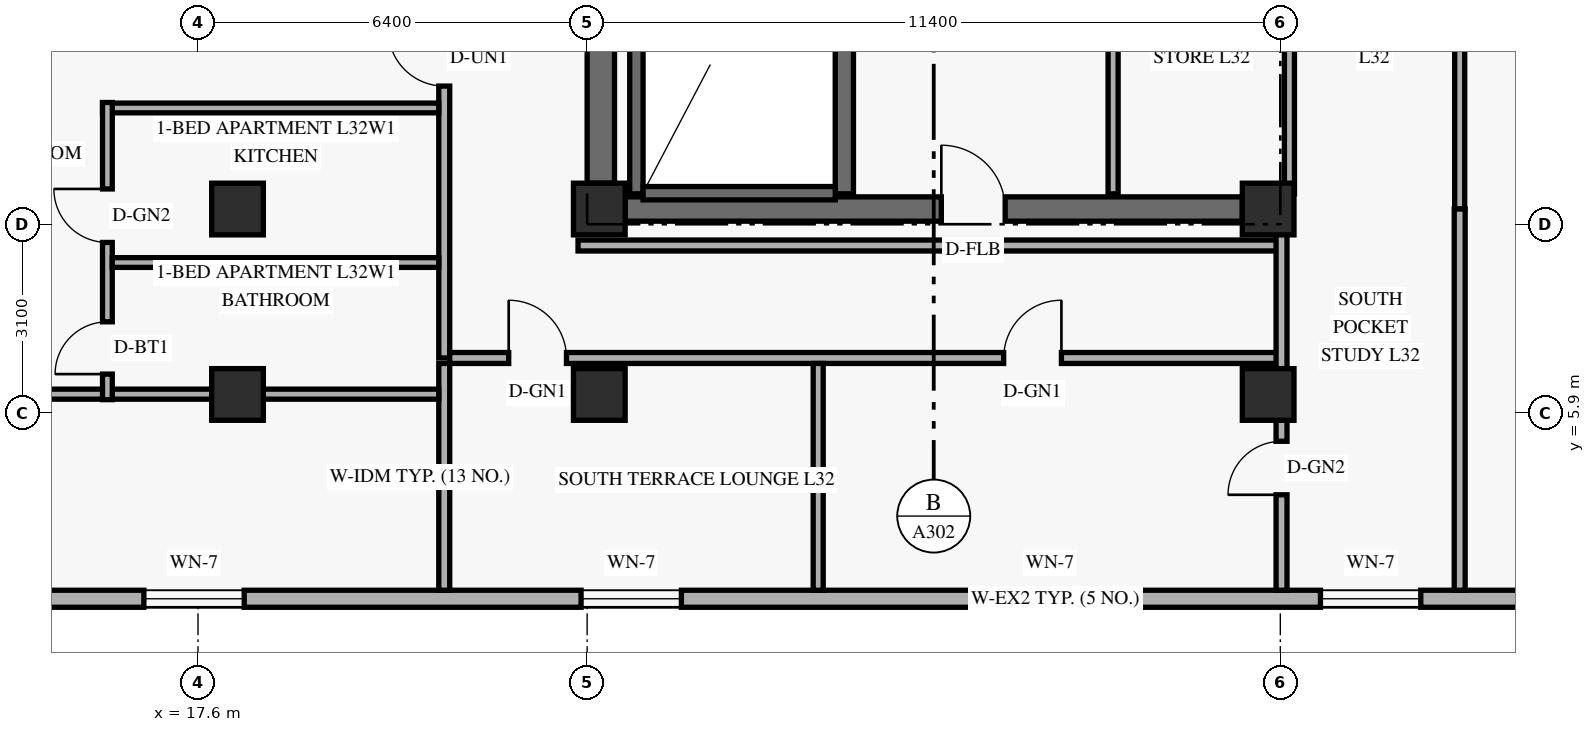
"""IFC4 building model, lengths in metres.
Left out: names, types, materials, properties, quantities, classifications, styles, units other than length and angle.
Written with IfcOpenShell. Run it as: python <this file> out.ifc"""

import sys

from ifc_helpers import new_model, si_unit, direction, frame, frame_2d, origin, origin_2d, place, context, subcontext, project, spatial, rectangle, extrude, element, fill, save


model = new_model("IFC4")
c1 = context("Model", 3, precision=1e-05, world=origin(), true_north=direction((0.0, 1.0)))
c2 = subcontext(c1, "Body", "Model", "MODEL_VIEW")
j1 = project(units=[si_unit("LENGTHUNIT", "METRE"), si_unit("PLANEANGLEUNIT", "RADIAN")], contexts=[c1])
p1 = place(None, origin())
s1 = spatial("IfcSite", under=j1, at=p1, CompositionType="ELEMENT")
p2 = place(p1, origin())
s2 = spatial("IfcBuilding", under=s1, at=p2, CompositionType="ELEMENT")
p3 = place(p2, frame((0.0, 0.0, 124.8)))
s3 = spatial("IfcBuildingStorey", under=s2, at=p3, CompositionType="ELEMENT", Elevation=124.8)
p4 = place(p3, frame((24.225, 9.675, 0.0), z_axis=(0.0, 0.0, 1.0), x_axis=(0.0, 1.0, 0.0)))
e1 = element("IfcWall", 1, at=p4, inside=s3, PredefinedType="SHEAR", context=c2, shape_type="SweptSolid", body=[
    extrude(rectangle(XDim=7.45, YDim=0.45, at=frame_2d((3.725, 0.0))), origin(), (0.0, 0.0, 1.0), 2.749),
])
p5 = place(p3, frame((24.625, 9.25, 0.0), z_axis=(0.0, 0.0, 1.0), x_axis=(1.0, 0.0, 0.0)))
e2 = element("IfcWall", 2, at=p5, inside=s3, PredefinedType="SHEAR", context=c2, shape_type="SweptSolid", body=[
    extrude(rectangle(XDim=10.15, YDim=0.4, at=frame_2d((5.075, 0.0))), origin(), (0.0, 0.0, 1.0), 3.36),
])
p6 = place(p5, frame((5.2, 0.0, 0.0)))
e3 = element("IfcOpeningElement", 3, at=p6, cuts=e2, PredefinedType="OPENING", context=c2, shape_type="SweptSolid", body=[
    extrude(rectangle(XDim=1.05, YDim=2.15, at=frame_2d((0.525, 1.075))), frame((0.0, 0.21, 0.0), z_axis=(0.0, -1.0, 0.0), x_axis=(1.0, 0.0, 0.0)), (0.0, 0.0, 1.0), 0.42),
])
p7 = place(p3, frame((24.81, 9.5, 0.0), z_axis=(0.0, 0.0, 1.0), x_axis=(0.0, 1.0, 0.0)))
e4 = element("IfcWall", 4, at=p7, inside=s3, PredefinedType="SHEAR", context=c2, shape_type="SweptSolid", body=[
    extrude(rectangle(XDim=7.76, YDim=0.22, at=frame_2d((3.88, 0.0))), origin(), (0.0, 0.0, 1.0), 3.36),
])
p8 = place(p3, frame((28.23, 9.5, 0.0), z_axis=(0.0, 0.0, 1.0), x_axis=(0.0, 1.0, 0.0)))
e5 = element("IfcWall", 5, at=p8, inside=s3, PredefinedType="SHEAR", context=c2, shape_type="SweptSolid", body=[
    extrude(rectangle(XDim=7.76, YDim=0.3, at=frame_2d((3.88, 0.0))), origin(), (0.0, 0.0, 1.0), 3.36),
])
p9 = place(p3, frame((24.92, 9.51, 0.0), z_axis=(0.0, 0.0, 1.0), x_axis=(1.0, 0.0, 0.0)))
e6 = element("IfcWall", 6, at=p9, inside=s3, PredefinedType="SHEAR", context=c2, shape_type="SweptSolid", body=[
    extrude(rectangle(XDim=3.16, YDim=0.22, at=frame_2d((1.58, 0.0))), origin(), (0.0, 0.0, 1.0), 3.36),
])
for number, where, z_axis, x_axis in (
    (7, (18.25, 6.2, 0.0), (0.0, 0.0, 1.0), (1.0, 0.0, 0.0)),
    (8, (18.25, 9.25, 0.0), (0.0, 0.0, 1.0), (1.0, 0.0, 0.0)),
    (9, (24.2, 6.2, 0.0), (0.0, 0.0, 1.0), (1.0, 0.0, 0.0)),
    (10, (24.2, 9.25, 0.0), (0.0, 0.0, 1.0), (1.0, 0.0, 0.0)),
    (11, (35.2, 6.2, 0.0), (0.0, 0.0, 1.0), (1.0, 0.0, 0.0)),
    (12, (35.2, 9.25, 0.0), (0.0, 0.0, 1.0), (1.0, 0.0, 0.0)),
):
    element("IfcColumn", number, at=place(p3, frame(where, z_axis=z_axis, x_axis=x_axis)), inside=s3, PredefinedType="COLUMN", context=c2, shape_type="SweptSolid", body=[
        extrude(rectangle(XDim=0.85, YDim=0.85, at=origin_2d()), origin(), (0.0, 0.0, 1.0), 3.6),
    ])
p10 = place(p3, frame((13.42, 2.84, 0.0), z_axis=(0.0, 0.0, 1.0), x_axis=(1.0, 0.0, 0.0)))
e13 = element("IfcWall", 13, at=p10, inside=s3, PredefinedType="SOLIDWALL", context=c2, shape_type="SweptSolid", body=[
    extrude(rectangle(XDim=36.56, YDim=0.28, at=frame_2d((18.28, 0.0))), origin(), (0.0, 0.0, 1.0), 3.36),
])
p11 = place(p10, frame((3.29, 0.0, 0.85)))
e14 = element("IfcOpeningElement", 14, at=p11, cuts=e13, PredefinedType="OPENING", context=c2, shape_type="SweptSolid", body=[
    extrude(rectangle(XDim=1.65, YDim=1.6, at=frame_2d((0.825, 0.8))), frame((0.0, 0.15, 0.0), z_axis=(0.0, -1.0, 0.0), x_axis=(1.0, 0.0, 0.0)), (0.0, 0.0, 1.0), 0.3),
])
p12 = place(p10, frame((10.48, 0.0, 0.85)))
e15 = element("IfcOpeningElement", 15, at=p12, cuts=e13, PredefinedType="OPENING", context=c2, shape_type="SweptSolid", body=[
    extrude(rectangle(XDim=1.65, YDim=1.6, at=frame_2d((0.825, 0.8))), frame((0.0, 0.15, 0.0), z_axis=(0.0, -1.0, 0.0), x_axis=(1.0, 0.0, 0.0)), (0.0, 0.0, 1.0), 0.3),
])
p13 = place(p10, frame((17.365, 0.0, 0.85)))
e16 = element("IfcOpeningElement", 16, at=p13, cuts=e13, PredefinedType="OPENING", context=c2, shape_type="SweptSolid", body=[
    extrude(rectangle(XDim=1.65, YDim=1.6, at=frame_2d((0.825, 0.8))), frame((0.0, 0.15, 0.0), z_axis=(0.0, -1.0, 0.0), x_axis=(1.0, 0.0, 0.0)), (0.0, 0.0, 1.0), 0.3),
])
p14 = place(p10, frame((22.64, 0.0, 0.85)))
e17 = element("IfcOpeningElement", 17, at=p14, cuts=e13, PredefinedType="OPENING", context=c2, shape_type="SweptSolid", body=[
    extrude(rectangle(XDim=1.65, YDim=1.6, at=frame_2d((0.825, 0.8))), frame((0.0, 0.15, 0.0), z_axis=(0.0, -1.0, 0.0), x_axis=(1.0, 0.0, 0.0)), (0.0, 0.0, 1.0), 0.3),
])
p15 = place(p10, frame((28.43, 0.0, 0.85)))
e18 = element("IfcOpeningElement", 18, at=p15, cuts=e13, PredefinedType="OPENING", context=c2, shape_type="SweptSolid", body=[
    extrude(rectangle(XDim=1.65, YDim=1.6, at=frame_2d((0.825, 0.8))), frame((0.0, 0.15, 0.0), z_axis=(0.0, -1.0, 0.0), x_axis=(1.0, 0.0, 0.0)), (0.0, 0.0, 1.0), 0.3),
])
p16 = place(p10, frame((34.245, 0.0, 0.85)))
e19 = element("IfcOpeningElement", 19, at=p16, cuts=e13, PredefinedType="OPENING", context=c2, shape_type="SweptSolid", body=[
    extrude(rectangle(XDim=1.65, YDim=1.6, at=frame_2d((0.825, 0.8))), frame((0.0, 0.15, 0.0), z_axis=(0.0, -1.0, 0.0), x_axis=(1.0, 0.0, 0.0)), (0.0, 0.0, 1.0), 0.3),
])
p17 = place(p3, frame((32.65, 9.5, 0.0), z_axis=(0.0, 0.0, 1.0), x_axis=(0.0, 1.0, 0.0)))
e20 = element("IfcWall", 20, at=p17, inside=s3, PredefinedType="PARTITIONING", context=c2, shape_type="SweptSolid", body=[
    extrude(rectangle(XDim=6.08, YDim=0.165, at=frame_2d((3.04, 0.0))), origin(), (0.0, 0.0, 1.0), 3.36),
])
p18 = place(p3, frame((38.35, 9.25, 0.0), z_axis=(0.0, 0.0, 1.0), x_axis=(0.0, 1.0, 0.0)))
e21 = element("IfcWall", 21, at=p18, inside=s3, PredefinedType="PARTITIONING", context=c2, shape_type="SweptSolid", body=[
    extrude(rectangle(XDim=6.248, YDim=0.165, at=frame_2d((3.124, 0.0))), origin(), (0.0, 0.0, 1.0), 2.731),
])
p19 = place(p3, frame((35.55, 9.5, 0.0), z_axis=(0.0, 0.0, 1.0), x_axis=(0.0, 1.0, 0.0)))
e22 = element("IfcWall", 22, at=p19, inside=s3, PredefinedType="PARTITIONING", context=c2, shape_type="SweptSolid", body=[
    extrude(rectangle(XDim=5.998, YDim=0.165, at=frame_2d((2.999, 0.0))), origin(), (0.0, 0.0, 1.0), 2.988),
])
p20 = place(p3, frame((21.65, 6.8, 0.0), z_axis=(0.0, 0.0, 1.0), x_axis=(0.0, 1.0, 0.0)))
e23 = element("IfcWall", 23, at=p20, inside=s3, PredefinedType="STANDARD", context=c2, shape_type="SweptSolid", body=[
    extrude(rectangle(XDim=34.4, YDim=0.18, at=frame_2d((17.2, 0.0))), origin(), (0.0, 0.0, 1.0), 2.731),
])
p21 = place(p20, frame((4.472, 0.0, 0.0)))
e24 = element("IfcOpeningElement", 24, at=p21, cuts=e23, PredefinedType="OPENING", context=c2, shape_type="SweptSolid", body=[
    extrude(rectangle(XDim=0.92, YDim=2.15, at=frame_2d((0.46, 1.075))), frame((0.0, 0.1, 0.0), z_axis=(0.0, -1.0, 0.0), x_axis=(1.0, 0.0, 0.0)), (0.0, 0.0, 1.0), 0.2),
])
p22 = place(p20, frame((7.261, 0.0, 0.0)))
e25 = element("IfcOpeningElement", 25, at=p22, cuts=e23, PredefinedType="OPENING", context=c2, shape_type="SweptSolid", body=[
    extrude(rectangle(XDim=0.92, YDim=2.15, at=frame_2d((0.46, 1.075))), frame((0.0, 0.1, 0.0), z_axis=(0.0, -1.0, 0.0), x_axis=(1.0, 0.0, 0.0)), (0.0, 0.0, 1.0), 0.2),
])
p23 = place(p20, frame((18.308, 0.0, 0.0)))
e26 = element("IfcOpeningElement", 26, at=p23, cuts=e23, PredefinedType="OPENING", context=c2, shape_type="SweptSolid", body=[
    extrude(rectangle(XDim=0.92, YDim=2.15, at=frame_2d((0.46, 1.075))), frame((0.0, 0.1, 0.0), z_axis=(0.0, -1.0, 0.0), x_axis=(1.0, 0.0, 0.0)), (0.0, 0.0, 1.0), 0.2),
])
p24 = place(p20, frame((29.045, 0.0, 0.0)))
e27 = element("IfcOpeningElement", 27, at=p24, cuts=e23, PredefinedType="OPENING", context=c2, shape_type="SweptSolid", body=[
    extrude(rectangle(XDim=0.92, YDim=2.15, at=frame_2d((0.46, 1.075))), frame((0.0, 0.1, 0.0), z_axis=(0.0, -1.0, 0.0), x_axis=(1.0, 0.0, 0.0)), (0.0, 0.0, 1.0), 0.2),
])
p25 = place(p3, frame((21.74, 6.8, 0.0), z_axis=(0.0, 0.0, 1.0), x_axis=(1.0, 0.0, 0.0)))
e28 = element("IfcWall", 28, at=p25, inside=s3, PredefinedType="STANDARD", context=c2, shape_type="SweptSolid", body=[
    extrude(rectangle(XDim=13.68, YDim=0.18, at=frame_2d((6.84, 0.0))), origin(), (0.0, 0.0, 1.0), 2.731),
])
p26 = place(p25, frame((0.97, 0.0, 0.0)))
e29 = element("IfcOpeningElement", 29, at=p26, cuts=e28, PredefinedType="OPENING", context=c2, shape_type="SweptSolid", body=[
    extrude(rectangle(XDim=0.95, YDim=2.15, at=frame_2d((0.475, 1.075))), frame((0.0, 0.1, 0.0), z_axis=(0.0, -1.0, 0.0), x_axis=(1.0, 0.0, 0.0)), (0.0, 0.0, 1.0), 0.2),
])
p27 = place(p25, frame((9.11, 0.0, 0.0)))
e30 = element("IfcOpeningElement", 30, at=p27, cuts=e28, PredefinedType="OPENING", context=c2, shape_type="SweptSolid", body=[
    extrude(rectangle(XDim=0.95, YDim=2.15, at=frame_2d((0.475, 1.075))), frame((0.0, 0.1, 0.0), z_axis=(0.0, -1.0, 0.0), x_axis=(1.0, 0.0, 0.0)), (0.0, 0.0, 1.0), 0.2),
])
p28 = place(p3, frame((23.85, 8.65, 0.0), z_axis=(0.0, 0.0, 1.0), x_axis=(1.0, 0.0, 0.0)))
e31 = element("IfcWall", 31, at=p28, inside=s3, PredefinedType="STANDARD", context=c2, shape_type="SweptSolid", body=[
    extrude(rectangle(XDim=11.57, YDim=0.18, at=frame_2d((5.785, 0.0))), origin(), (0.0, 0.0, 1.0), 2.731),
])
p29 = place(p3, frame((21.65, 2.98, 0.0), z_axis=(0.0, 0.0, 1.0), x_axis=(0.0, 1.0, 0.0)))
e32 = element("IfcWall", 32, at=p29, inside=s3, PredefinedType="PARTITIONING", context=c2, shape_type="SweptSolid", body=[
    extrude(rectangle(XDim=3.73, YDim=0.18, at=frame_2d((1.865, 0.0))), origin(), (0.0, 0.0, 1.0), 2.809),
])
p30 = place(p3, frame((35.42, 2.98, 0.0), z_axis=(0.0, 0.0, 1.0), x_axis=(0.0, 1.0, 0.0)))
e33 = element("IfcWall", 33, at=p30, inside=s3, PredefinedType="PARTITIONING", context=c2, shape_type="SweptSolid", body=[
    extrude(rectangle(XDim=6.27, YDim=0.18, at=frame_2d((3.135, 0.0))), origin(), (0.0, 0.0, 1.0), 2.731),
])
p31 = place(p30, frame((1.57, 0.0, 0.0)))
e34 = element("IfcOpeningElement", 34, at=p31, cuts=e33, PredefinedType="OPENING", context=c2, shape_type="SweptSolid", body=[
    extrude(rectangle(XDim=0.88, YDim=2.12, at=frame_2d((0.44, 1.06))), frame((0.0, 0.1, 0.0), z_axis=(0.0, -1.0, 0.0), x_axis=(1.0, 0.0, 0.0)), (0.0, 0.0, 1.0), 0.2),
])
p32 = place(p3, frame((38.35, 2.98, 0.0), z_axis=(0.0, 0.0, 1.0), x_axis=(0.0, 1.0, 0.0)))
e35 = element("IfcWall", 35, at=p32, inside=s3, PredefinedType="PARTITIONING", context=c2, shape_type="SweptSolid", body=[
    extrude(rectangle(XDim=6.27, YDim=0.18, at=frame_2d((3.135, 0.0))), origin(), (0.0, 0.0, 1.0), 2.731),
])
p33 = place(p3, frame((10.099, 6.205, 0.0), z_axis=(0.0, 0.0, 1.0), x_axis=(1.0, 0.0, 0.0)))
e36 = element("IfcWall", 36, at=p33, inside=s3, PredefinedType="PARTITIONING", context=c2, shape_type="SweptSolid", body=[
    extrude(rectangle(XDim=11.461, YDim=0.165, at=frame_2d((5.73, 0.0))), origin(), (0.0, 0.0, 1.0), 2.809),
])
p34 = place(p33, frame((2.391, 0.0, 0.0)))
e37 = element("IfcOpeningElement", 37, at=p34, cuts=e36, PredefinedType="OPENING", context=c2, shape_type="SweptSolid", body=[
    extrude(rectangle(XDim=0.9, YDim=2.14, at=frame_2d((0.45, 1.07))), frame((0.0, 0.093, 0.0), z_axis=(0.0, -1.0, 0.0), x_axis=(1.0, 0.0, 0.0)), (0.0, 0.0, 1.0), 0.185),
])
p35 = place(p3, frame((16.03, 10.912, 0.0), z_axis=(0.0, 0.0, 1.0), x_axis=(1.0, 0.0, 0.0)))
e38 = element("IfcWall", 38, at=p35, inside=s3, PredefinedType="PLUMBINGWALL", context=c2, shape_type="SweptSolid", body=[
    extrude(rectangle(XDim=5.53, YDim=0.16, at=frame_2d((2.765, 0.0))), origin(), (0.0, 0.0, 1.0), 2.731),
])
p36 = place(p3, frame((16.11, 6.115, 0.0), z_axis=(0.0, 0.0, 1.0), x_axis=(0.0, 1.0, 0.0)))
e39 = element("IfcWall", 39, at=p36, inside=s3, PredefinedType="PLUMBINGWALL", context=c2, shape_type="SweptSolid", body=[
    extrude(rectangle(XDim=4.887, YDim=0.16, at=frame_2d((2.443, 0.0))), origin(), (0.0, 0.0, 1.0), 2.731),
])
p37 = place(p36, frame((0.42, 0.0, 0.0)))
e40 = element("IfcOpeningElement", 40, at=p37, cuts=e39, PredefinedType="OPENING", context=c2, shape_type="SweptSolid", body=[
    extrude(rectangle(XDim=0.86, YDim=2.12, at=frame_2d((0.43, 1.06))), frame((0.0, 0.09, 0.0), z_axis=(0.0, -1.0, 0.0), x_axis=(1.0, 0.0, 0.0)), (0.0, 0.0, 1.0), 0.18),
])
p38 = place(p36, frame((2.585, 0.0, 0.0)))
e41 = element("IfcOpeningElement", 41, at=p38, cuts=e39, PredefinedType="OPENING", context=c2, shape_type="SweptSolid", body=[
    extrude(rectangle(XDim=0.88, YDim=2.12, at=frame_2d((0.44, 1.06))), frame((0.0, 0.09, 0.0), z_axis=(0.0, -1.0, 0.0), x_axis=(1.0, 0.0, 0.0)), (0.0, 0.0, 1.0), 0.18),
])
p39 = place(p3, frame((16.19, 8.37, 0.0), z_axis=(0.0, 0.0, 1.0), x_axis=(1.0, 0.0, 0.0)))
e42 = element("IfcWall", 42, at=p39, inside=s3, PredefinedType="PLUMBINGWALL", context=c2, shape_type="SweptSolid", body=[
    extrude(rectangle(XDim=5.37, YDim=0.16, at=frame_2d((2.685, 0.0))), origin(), (0.0, 0.0, 1.0), 2.731),
])
p40 = place(p3, frame((27.8, 2.98, 0.0), z_axis=(0.0, 0.0, 1.0), x_axis=(0.0, 1.0, 0.0)))
e43 = element("IfcWall", 43, at=p40, inside=s3, PredefinedType="PARTITIONING", context=c2, shape_type="SweptSolid", body=[
    extrude(rectangle(XDim=3.73, YDim=0.165, at=frame_2d((1.865, 0.0))), origin(), (0.0, 0.0, 1.0), 2.809),
])
p41 = place(p11, origin())
e44 = element("IfcWindow", 44, at=p41, inside=s3, PartitioningType="SINGLE_PANEL", PredefinedType="WINDOW", context=c2, shape_type="SweptSolid", body=[
    extrude(rectangle(XDim=1.65, YDim=1.6, at=frame_2d((0.825, 0.8))), frame((0.0, 0.03, 0.0), z_axis=(0.0, -1.0, 0.0), x_axis=(1.0, 0.0, 0.0)), (0.0, 0.0, 1.0), 0.06),
])
fill(e14, e44)
p42 = place(p12, origin())
e45 = element("IfcWindow", 45, at=p42, inside=s3, PartitioningType="SINGLE_PANEL", PredefinedType="WINDOW", context=c2, shape_type="SweptSolid", body=[
    extrude(rectangle(XDim=1.65, YDim=1.6, at=frame_2d((0.825, 0.8))), frame((0.0, 0.03, 0.0), z_axis=(0.0, -1.0, 0.0), x_axis=(1.0, 0.0, 0.0)), (0.0, 0.0, 1.0), 0.06),
])
fill(e15, e45)
p43 = place(p13, origin())
e46 = element("IfcWindow", 46, at=p43, inside=s3, PartitioningType="SINGLE_PANEL", PredefinedType="WINDOW", context=c2, shape_type="SweptSolid", body=[
    extrude(rectangle(XDim=1.65, YDim=1.6, at=frame_2d((0.825, 0.8))), frame((0.0, 0.03, 0.0), z_axis=(0.0, -1.0, 0.0), x_axis=(1.0, 0.0, 0.0)), (0.0, 0.0, 1.0), 0.06),
])
fill(e16, e46)
p44 = place(p14, origin())
e47 = element("IfcWindow", 47, at=p44, inside=s3, PartitioningType="SINGLE_PANEL", PredefinedType="WINDOW", context=c2, shape_type="SweptSolid", body=[
    extrude(rectangle(XDim=1.65, YDim=1.6, at=frame_2d((0.825, 0.8))), frame((0.0, 0.03, 0.0), z_axis=(0.0, -1.0, 0.0), x_axis=(1.0, 0.0, 0.0)), (0.0, 0.0, 1.0), 0.06),
])
fill(e17, e47)
p45 = place(p6, origin())
e48 = element("IfcDoor", 48, at=p45, inside=s3, OperationType="SINGLE_SWING_LEFT", PredefinedType="DOOR", context=c2, shape_type="SweptSolid", body=[
    extrude(rectangle(XDim=1.05, YDim=2.15, at=frame_2d((0.525, 1.075))), frame((0.0, 0.025, 0.0), z_axis=(0.0, -1.0, 0.0), x_axis=(1.0, 0.0, 0.0)), (0.0, 0.0, 1.0), 0.05),
])
fill(e3, e48)
p46 = place(p31, origin())
e49 = element("IfcDoor", 49, at=p46, inside=s3, OperationType="SINGLE_SWING_LEFT", PredefinedType="DOOR", context=c2, shape_type="SweptSolid", body=[
    extrude(rectangle(XDim=0.88, YDim=2.12, at=frame_2d((0.44, 1.06))), frame((0.0, 0.025, 0.0), z_axis=(0.0, -1.0, 0.0), x_axis=(1.0, 0.0, 0.0)), (0.0, 0.0, 1.0), 0.05),
])
fill(e34, e49)
p47 = place(p21, origin())
e50 = element("IfcDoor", 50, at=p47, inside=s3, OperationType="SINGLE_SWING_RIGHT", PredefinedType="DOOR", context=c2, shape_type="SweptSolid", body=[
    extrude(rectangle(XDim=0.92, YDim=2.15, at=frame_2d((0.46, 1.075))), frame((0.0, 0.025, 0.0), z_axis=(0.0, -1.0, 0.0), x_axis=(1.0, 0.0, 0.0)), (0.0, 0.0, 1.0), 0.05),
])
fill(e24, e50)
p48 = place(p37, origin())
e51 = element("IfcDoor", 51, at=p48, inside=s3, OperationType="SINGLE_SWING_LEFT", PredefinedType="DOOR", context=c2, shape_type="SweptSolid", body=[
    extrude(rectangle(XDim=0.86, YDim=2.12, at=frame_2d((0.43, 1.06))), frame((0.0, 0.025, 0.0), z_axis=(0.0, -1.0, 0.0), x_axis=(1.0, 0.0, 0.0)), (0.0, 0.0, 1.0), 0.05),
])
fill(e40, e51)
p49 = place(p38, origin())
e52 = element("IfcDoor", 52, at=p49, inside=s3, OperationType="SINGLE_SWING_RIGHT", PredefinedType="DOOR", context=c2, shape_type="SweptSolid", body=[
    extrude(rectangle(XDim=0.88, YDim=2.12, at=frame_2d((0.44, 1.06))), frame((0.0, 0.025, 0.0), z_axis=(0.0, -1.0, 0.0), x_axis=(1.0, 0.0, 0.0)), (0.0, 0.0, 1.0), 0.05),
])
fill(e41, e52)
p50 = place(p26, origin())
e53 = element("IfcDoor", 53, at=p50, inside=s3, OperationType="SINGLE_SWING_LEFT", PredefinedType="DOOR", context=c2, shape_type="SweptSolid", body=[
    extrude(rectangle(XDim=0.95, YDim=2.15, at=frame_2d((0.475, 1.075))), frame((0.0, 0.025, 0.0), z_axis=(0.0, -1.0, 0.0), x_axis=(1.0, 0.0, 0.0)), (0.0, 0.0, 1.0), 0.05),
])
fill(e29, e53)
p51 = place(p27, origin())
e54 = element("IfcDoor", 54, at=p51, inside=s3, OperationType="SINGLE_SWING_RIGHT", PredefinedType="DOOR", context=c2, shape_type="SweptSolid", body=[
    extrude(rectangle(XDim=0.95, YDim=2.15, at=frame_2d((0.475, 1.075))), frame((0.0, 0.025, 0.0), z_axis=(0.0, -1.0, 0.0), x_axis=(1.0, 0.0, 0.0)), (0.0, 0.0, 1.0), 0.05),
])
fill(e30, e54)
save(model, sys.argv[1])
